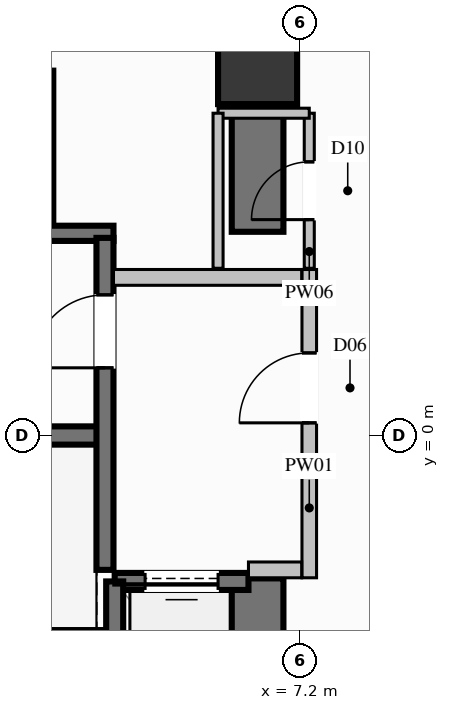
"""IFC4 building model, lengths in metres.
Left out: names, types, materials, properties, quantities, classifications, styles, units other than length and angle.
Written with IfcOpenShell. Run it as: python <this file> out.ifc"""

import sys

from ifc_helpers import new_model, si_unit, direction, frame, frame_2d, origin, origin_2d, place, context, subcontext, project, spatial, rectangle, extrude, element, fill, save


model = new_model("IFC4")
c1 = context("Model", 3, precision=1e-05, world=origin(), true_north=direction((0.0, 1.0)))
c2 = subcontext(c1, "Body", "Model", "MODEL_VIEW")
j1 = project(units=[si_unit("LENGTHUNIT", "METRE"), si_unit("PLANEANGLEUNIT", "RADIAN")], contexts=[c1])
p1 = place(None, origin())
s1 = spatial("IfcSite", under=j1, at=p1, CompositionType="ELEMENT")
p2 = place(p1, origin())
s2 = spatial("IfcBuilding", under=s1, at=p2, CompositionType="ELEMENT")
p3 = place(p2, frame((0.0, 0.0, 18.6)))
s3 = spatial("IfcBuildingStorey", under=s2, at=p3, CompositionType="ELEMENT", Elevation=18.6)
p4 = place(p3, frame((6.5, 6.1, 0.0), z_axis=(0.0, 0.0, 1.0), x_axis=(1.0, 0.0, 0.0)))
e1 = element("IfcColumn", 1, at=p4, inside=s3, PredefinedType="COLUMN", context=c2, shape_type="SweptSolid", body=[
    extrude(rectangle(XDim=1.3, YDim=1.3, at=origin_2d()), origin(), (0.0, 0.0, 1.0), 5.0),
])
p5 = place(p3, frame((-3.99, 0.0, 0.0), z_axis=(0.0, 0.0, 1.0), x_axis=(1.0, 0.0, 0.0)))
e2 = element("IfcWall", 2, at=p5, inside=s3, PredefinedType="SHEAR", context=c2, shape_type="SweptSolid", body=[
    extrude(rectangle(XDim=7.98, YDim=0.3, at=frame_2d((3.99, 0.0))), origin(), (0.0, 0.0, 1.0), 5.0),
])
for number, where, z_axis, x_axis in (
    (3, (-4.13, -3.325, 0.0), (0.0, 0.0, 1.0), (1.0, 0.0, 0.0)),
    (4, (-4.13, 3.325, 0.0), (0.0, 0.0, 1.0), (1.0, 0.0, 0.0)),
):
    element("IfcWall", number, at=place(p3, frame(where, z_axis=z_axis, x_axis=x_axis)), inside=s3, PredefinedType="SOLIDWALL", context=c2, shape_type="SweptSolid", body=[
        extrude(rectangle(XDim=8.26, YDim=0.25, at=frame_2d((4.13, 0.0))), origin(), (0.0, 0.0, 1.0), 5.0),
    ])
p6 = place(p3, frame((5.85, 6.1, 0.0), z_axis=(0.0, 0.0, 1.0), x_axis=(1.0, 0.0, 0.0)))
e5 = element("IfcWall", 5, at=p6, inside=s3, PredefinedType="SHEAR", context=c2, shape_type="SweptSolid", body=[
    extrude(rectangle(XDim=0.225, YDim=0.85, at=frame_2d((0.112, 0.0))), origin(), (0.0, 0.0, 1.0), 5.0),
])
p7 = place(p3, frame((6.5, -6.525, 0.0), z_axis=(0.0, 0.0, 1.0), x_axis=(0.0, 1.0, 0.0)))
e6 = element("IfcWall", 6, at=p7, inside=s3, PredefinedType="SHEAR", context=c2, shape_type="SweptSolid", body=[
    extrude(rectangle(XDim=4.175, YDim=0.85, at=frame_2d((2.087, 0.0))), origin(), (0.0, 0.0, 1.0), 5.0),
])
p8 = place(p3, frame((6.5, 3.35, 0.0), z_axis=(0.0, 0.0, 1.0), x_axis=(0.0, 1.0, 0.0)))
e7 = element("IfcWall", 7, at=p8, inside=s3, PredefinedType="SHEAR", context=c2, shape_type="SweptSolid", body=[
    extrude(rectangle(XDim=3.175, YDim=0.85, at=frame_2d((1.587, 0.0))), origin(), (0.0, 0.0, 1.0), 5.0),
])
p9 = place(p3, frame((3.0, 3.5, 0.0), z_axis=(0.0, 0.0, 1.0), x_axis=(0.0, 1.0, 0.0)))
e8 = element("IfcWall", 8, at=p9, inside=s3, PredefinedType="SOLIDWALL", context=c2, shape_type="SweptSolid", body=[
    extrude(rectangle(XDim=2.5, YDim=0.28, at=frame_2d((1.25, 0.0))), origin(), (0.0, 0.0, 1.0), 4.64),
])
p10 = place(p3, frame((6.35, -2.4, 0.0), z_axis=(0.0, 0.0, 1.0), x_axis=(-1.0, 0.0, 0.0)))
e9 = element("IfcWall", 9, at=p10, inside=s3, PredefinedType="SOLIDWALL", context=c2, shape_type="SweptSolid", body=[
    extrude(rectangle(XDim=2.2, YDim=0.28, at=frame_2d((1.1, 0.0))), origin(), (0.0, 0.0, 1.0), 4.64),
])
p11 = place(p10, frame((0.5, 0.0, 0.0)))
e10 = element("IfcOpeningElement", 10, at=p11, cuts=e9, PredefinedType="OPENING", context=c2, shape_type="SweptSolid", body=[
    extrude(rectangle(XDim=1.2, YDim=2.2, at=frame_2d((0.6, 1.1))), frame((0.0, 0.15, 0.0), z_axis=(0.0, -1.0, 0.0), x_axis=(1.0, 0.0, 0.0)), (0.0, 0.0, 1.0), 0.3),
])
p12 = place(p3, frame((4.15, -2.4, 0.0), z_axis=(0.0, 0.0, 1.0), x_axis=(0.0, -1.0, 0.0)))
e11 = element("IfcWall", 11, at=p12, inside=s3, PredefinedType="SOLIDWALL", context=c2, shape_type="SweptSolid", body=[
    extrude(rectangle(XDim=2.7, YDim=0.28, at=frame_2d((1.35, 0.0))), origin(), (0.0, 0.0, 1.0), 4.64),
])
p13 = place(p3, frame((3.99, -2.21, 0.0), z_axis=(0.0, 0.0, 1.0), x_axis=(0.0, 1.0, 0.0)))
e12 = element("IfcWall", 12, at=p13, inside=s3, PredefinedType="SOLIDWALL", context=c2, shape_type="SweptSolid", body=[
    extrude(rectangle(XDim=5.46, YDim=0.28, at=frame_2d((2.73, 0.0))), origin(), (0.0, 0.0, 1.0), 4.64),
])
p14 = place(p13, frame((3.323, 0.0, 0.0)))
e13 = element("IfcOpeningElement", 13, at=p14, cuts=e12, PredefinedType="OPENING", context=c2, shape_type="SweptSolid", body=[
    extrude(rectangle(XDim=1.2, YDim=2.2, at=frame_2d((0.6, 1.1))), frame((0.0, 0.15, 0.0), z_axis=(0.0, -1.0, 0.0), x_axis=(1.0, 0.0, 0.0)), (0.0, 0.0, 1.0), 0.3),
])
p15 = place(p3, frame((7.35, -2.34, 0.0), z_axis=(0.0, 0.0, 1.0), x_axis=(0.0, 1.0, 0.0)))
e14 = element("IfcWall", 14, at=p15, inside=s3, PredefinedType="PARTITIONING", context=c2, shape_type="SweptSolid", body=[
    extrude(rectangle(XDim=5.07, YDim=0.24, at=frame_2d((2.535, 0.0))), origin(), (0.0, 0.0, 1.0), 3.525),
])
p16 = place(p15, frame((2.548, 0.0, 0.0)))
e15 = element("IfcOpeningElement", 15, at=p16, cuts=e14, PredefinedType="OPENING", context=c2, shape_type="SweptSolid", body=[
    extrude(rectangle(XDim=1.15, YDim=2.2, at=frame_2d((0.575, 1.1))), frame((0.0, 0.13, 0.0), z_axis=(0.0, -1.0, 0.0), x_axis=(1.0, 0.0, 0.0)), (0.0, 0.0, 1.0), 0.26),
])
p17 = place(p3, frame((6.35, -2.21, 0.0), z_axis=(0.0, 0.0, 1.0), x_axis=(1.0, 0.0, 0.0)))
e16 = element("IfcWall", 16, at=p17, inside=s3, PredefinedType="PARTITIONING", context=c2, shape_type="SweptSolid", body=[
    extrude(rectangle(XDim=0.875, YDim=0.26, at=frame_2d((0.438, 0.0))), origin(), (0.0, 0.0, 1.0), 4.64),
])
p18 = place(p3, frame((4.13, 2.6, 0.0), z_axis=(0.0, 0.0, 1.0), x_axis=(1.0, 0.0, 0.0)))
e17 = element("IfcWall", 17, at=p18, inside=s3, PredefinedType="PARTITIONING", context=c2, shape_type="SweptSolid", body=[
    extrude(rectangle(XDim=3.095, YDim=0.26, at=frame_2d((1.548, 0.0))), origin(), (0.0, 0.0, 1.0), 4.64),
])
p19 = place(p3, frame((7.35, 2.75, 0.0), z_axis=(0.0, 0.0, 1.0), x_axis=(0.0, 1.0, 0.0)))
e18 = element("IfcWall", 18, at=p19, inside=s3, PredefinedType="PARTITIONING", context=c2, shape_type="SweptSolid", body=[
    extrude(rectangle(XDim=2.55, YDim=0.165, at=frame_2d((1.275, 0.0))), origin(), (0.0, 0.0, 1.0), 3.525),
])
p20 = place(p19, frame((0.8, 0.0, 0.0)))
e19 = element("IfcOpeningElement", 19, at=p20, cuts=e18, PredefinedType="OPENING", context=c2, shape_type="SweptSolid", body=[
    extrude(rectangle(XDim=0.95, YDim=2.1, at=frame_2d((0.475, 1.05))), frame((0.0, 0.093, 0.0), z_axis=(0.0, -1.0, 0.0), x_axis=(1.0, 0.0, 0.0)), (0.0, 0.0, 1.0), 0.185),
])
p21 = place(p3, frame((7.35, 5.3, 0.0), z_axis=(0.0, 0.0, 1.0), x_axis=(-1.0, 0.0, 0.0)))
e20 = element("IfcWall", 20, at=p21, inside=s3, PredefinedType="PARTITIONING", context=c2, shape_type="SweptSolid", body=[
    extrude(rectangle(XDim=1.5, YDim=0.165, at=frame_2d((0.75, 0.0))), origin(), (0.0, 0.0, 1.0), 3.525),
])
p22 = place(p3, frame((5.85, 5.3, 0.0), z_axis=(0.0, 0.0, 1.0), x_axis=(0.0, -1.0, 0.0)))
e21 = element("IfcWall", 21, at=p22, inside=s3, PredefinedType="PARTITIONING", context=c2, shape_type="SweptSolid", body=[
    extrude(rectangle(XDim=2.55, YDim=0.165, at=frame_2d((1.275, 0.0))), origin(), (0.0, 0.0, 1.0), 3.525),
])
p23 = place(p11, origin())
e22 = element("IfcDoor", 22, at=p23, inside=s3, OperationType="SLIDING_TO_LEFT", PredefinedType="DOOR", context=c2, shape_type="SweptSolid", body=[
    extrude(rectangle(XDim=1.2, YDim=2.2, at=frame_2d((0.6, 1.1))), frame((0.0, 0.025, 0.0), z_axis=(0.0, -1.0, 0.0), x_axis=(1.0, 0.0, 0.0)), (0.0, 0.0, 1.0), 0.05),
])
fill(e10, e22)
p24 = place(p14, origin())
e23 = element("IfcDoor", 23, at=p24, inside=s3, OperationType="SINGLE_SWING_LEFT", PredefinedType="DOOR", context=c2, shape_type="SweptSolid", body=[
    extrude(rectangle(XDim=1.2, YDim=2.2, at=frame_2d((0.6, 1.1))), frame((0.0, 0.025, 0.0), z_axis=(0.0, -1.0, 0.0), x_axis=(1.0, 0.0, 0.0)), (0.0, 0.0, 1.0), 0.05),
])
fill(e13, e23)
p25 = place(p16, origin())
e24 = element("IfcDoor", 24, at=p25, inside=s3, OperationType="SINGLE_SWING_LEFT", PredefinedType="DOOR", context=c2, shape_type="SweptSolid", body=[
    extrude(rectangle(XDim=1.15, YDim=2.2, at=frame_2d((0.575, 1.1))), frame((0.0, 0.025, 0.0), z_axis=(0.0, -1.0, 0.0), x_axis=(1.0, 0.0, 0.0)), (0.0, 0.0, 1.0), 0.05),
])
fill(e15, e24)
p26 = place(p20, origin())
e25 = element("IfcDoor", 25, at=p26, inside=s3, OperationType="SINGLE_SWING_LEFT", PredefinedType="DOOR", context=c2, shape_type="SweptSolid", body=[
    extrude(rectangle(XDim=0.95, YDim=2.1, at=frame_2d((0.475, 1.05))), frame((0.0, 0.025, 0.0), z_axis=(0.0, -1.0, 0.0), x_axis=(1.0, 0.0, 0.0)), (0.0, 0.0, 1.0), 0.05),
])
fill(e19, e25)
save(model, sys.argv[1])
